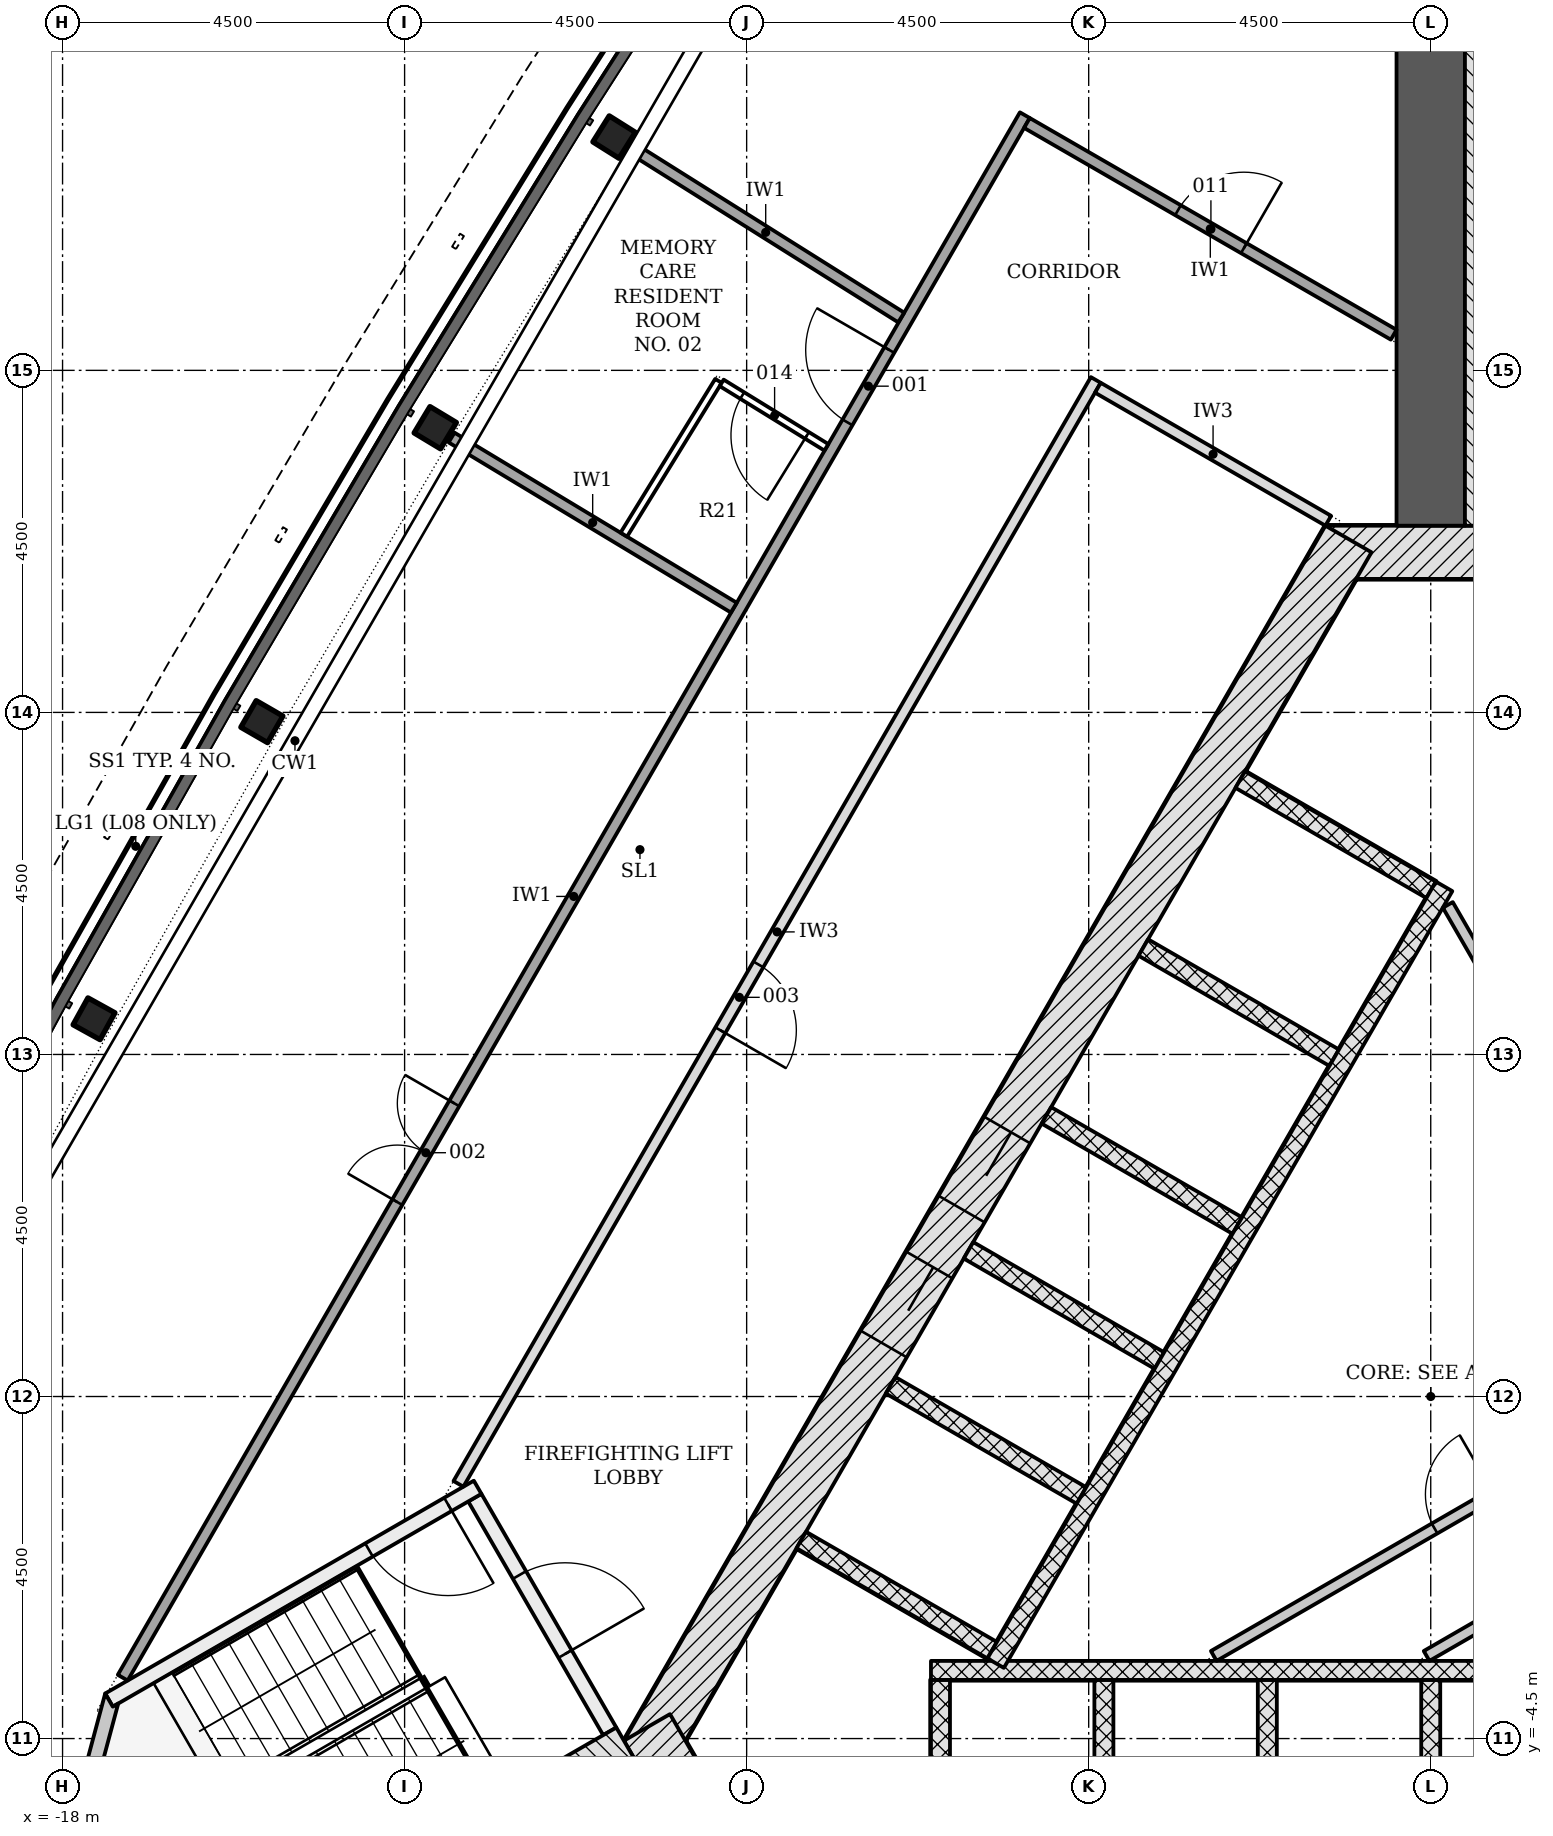
"""IFC4 building model, lengths in metres.
Left out: names, types, materials, properties, quantities, classifications, styles, units other than length and angle.
Written with IfcOpenShell. Run it as: python <this file> out.ifc"""

import sys

from ifc_helpers import new_model, si_unit, direction, frame, frame_2d, origin, origin_2d, place, context, subcontext, project, spatial, polyline, rectangle, i_section, outline, extrude, element, fill, save


model = new_model("IFC4")
c1 = context("Model", 3, precision=1e-05, world=origin(), true_north=direction((0.0, 1.0)))
c2 = subcontext(c1, "Body", "Model", "MODEL_VIEW")
j1 = project(units=[si_unit("LENGTHUNIT", "METRE"), si_unit("PLANEANGLEUNIT", "RADIAN")], contexts=[c1])
p1 = place(None, origin())
s1 = spatial("IfcSite", under=j1, at=p1, CompositionType="ELEMENT")
p2 = place(p1, origin())
s2 = spatial("IfcBuilding", under=s1, at=p2, CompositionType="ELEMENT")
p3 = place(p2, frame((0.0, 0.0, 34.8)))
s3 = spatial("IfcBuildingStorey", under=s2, at=p3, CompositionType="ELEMENT", Elevation=34.8)
p4 = place(p3, frame((1.386, 11.106, -0.2), z_axis=(0.0, 0.0, 1.0), x_axis=(-1.0, 0.0, 0.0)))
e1 = element("IfcWall", 1, at=p4, inside=s3, PredefinedType="SHEAR", context=c2, shape_type="SweptSolid", body=[
    extrude(rectangle(XDim=2.771, YDim=0.7, at=frame_2d((1.386, 0.0))), origin(), (0.0, 0.0, 1.0), 3.6),
])
p5 = place(p3, frame((-1.083, 11.281, -0.2), z_axis=(0.0, 0.0, 1.0), x_axis=(-0.500001446645, -0.866024568562, 0.0)))
e2 = element("IfcWall", 2, at=p5, inside=s3, PredefinedType="SHEAR", context=c2, shape_type="SweptSolid", body=[
    extrude(rectangle(XDim=18.458, YDim=0.7, at=frame_2d((9.229, 0.0))), origin(), (0.0, 0.0, 1.0), 3.6),
])
p6 = place(p5, frame((8.979, 0.0, 0.2)))
e3 = element("IfcOpeningElement", 3, at=p6, cuts=e2, PredefinedType="OPENING", context=c2, shape_type="SweptSolid", body=[
    extrude(rectangle(XDim=1.2, YDim=2.1, at=frame_2d((0.6, 1.05))), frame((0.0, 0.36, 0.0), z_axis=(0.0, -1.0, 0.0), x_axis=(1.0, 0.0, 0.0)), (0.0, 0.0, 1.0), 0.72),
])
p7 = place(p5, frame((11.029, 0.0, 0.2)))
e4 = element("IfcOpeningElement", 4, at=p7, cuts=e2, PredefinedType="OPENING", context=c2, shape_type="SweptSolid", body=[
    extrude(rectangle(XDim=1.2, YDim=2.1, at=frame_2d((0.6, 1.05))), frame((0.0, 0.36, 0.0), z_axis=(0.0, -1.0, 0.0), x_axis=(1.0, 0.0, 0.0)), (0.0, 0.0, 1.0), 0.72),
])
p8 = place(p3, frame((-10.311, -4.353, -0.2), z_axis=(0.0, 0.0, 1.0), x_axis=(0.500042739161, -0.866000726912, 0.0)))
e5 = element("IfcWall", 5, at=p8, inside=s3, PredefinedType="SHEAR", context=c2, shape_type="SweptSolid", body=[
    extrude(rectangle(XDim=2.771, YDim=0.7, at=frame_2d((1.386, 0.0))), origin(), (0.0, 0.0, 1.0), 3.6),
])
p9 = place(p3, frame((0.0, 11.456, -0.2), z_axis=(0.0, 0.0, 1.0), x_axis=(0.0, 1.0, 0.0)))
e6 = element("IfcWall", 6, at=p9, inside=s3, PredefinedType="SHEAR", context=c2, shape_type="SweptSolid", body=[
    extrude(rectangle(XDim=14.309, YDim=0.9, at=frame_2d((7.154, 0.0))), origin(), (0.0, 0.0, 1.0), 3.6),
])
for number, where, z_axis, x_axis in (
    (7, (-10.744, 16.569, -0.2), (0.0, 0.0, 1.0), (-0.532, -0.847, 0.0)),
    (8, (-13.097, 12.745, -0.2), (0.0, 0.0, 1.0), (-0.516, -0.857, 0.0)),
    (9, (-15.378, 8.878, -0.2), (0.0, 0.0, 1.0), (-0.5, -0.866, 0.0)),
    (10, (-17.586, 4.969, -0.2), (0.0, 0.0, 1.0), (-0.484, -0.875, 0.0)),
):
    element("IfcColumn", number, at=place(p3, frame(where, z_axis=z_axis, x_axis=x_axis)), inside=s3, PredefinedType="COLUMN", context=c2, shape_type="SweptSolid", body=[
        extrude(i_section(OverallWidth=0.404, OverallDepth=0.406, WebThickness=0.027, FlangeThickness=0.044, FilletRadius=0.015, at=origin_2d()), origin(), (0.0, 0.0, 1.0), 3.6),
    ])
for number, where, z_axis, x_axis in (
    (11, (-6.45, -6.228, -0.2), (0.0, 0.0, 1.0), (0.0, 1.0, 0.0)),
    (12, (-4.3, -6.228, -0.2), (0.0, 0.0, 1.0), (0.0, 1.0, 0.0)),
    (13, (-2.15, -6.228, -0.2), (0.0, 0.0, 1.0), (0.0, 1.0, 0.0)),
    (14, (0.0, -6.228, -0.2), (0.0, 0.0, 1.0), (0.0, 1.0, 0.0)),
):
    element("IfcWall", number, at=place(p3, frame(where, z_axis=z_axis, x_axis=x_axis)), inside=s3, PredefinedType="PARTITIONING", context=c2, shape_type="SweptSolid", body=[
        extrude(rectangle(XDim=2.5, YDim=0.25, at=frame_2d((1.25, 0.0))), origin(), (0.0, 0.0, 1.0), 3.6),
    ])
p10 = place(p3, frame((-6.575, -3.603, 0.0), z_axis=(0.0, 0.0, 1.0), x_axis=(1.0, 0.0, 0.0)))
e15 = element("IfcWall", 15, at=p10, inside=s3, PredefinedType="PARTITIONING", context=c2, shape_type="SweptSolid", body=[
    extrude(rectangle(XDim=13.15, YDim=0.25, at=frame_2d((6.575, 0.0))), origin(), (0.0, 0.0, 1.0), 3.4),
])
p11 = place(p3, frame((-2.506, 8.115, -0.2), z_axis=(0.0, 0.0, 1.0), x_axis=(0.865996321171, -0.50005036918, 0.0)))
e16 = element("IfcWall", 16, at=p11, inside=s3, PredefinedType="PARTITIONING", context=c2, shape_type="SweptSolid", body=[
    extrude(rectangle(XDim=2.9, YDim=0.25, at=frame_2d((1.45, 0.0))), origin(), (0.0, 0.0, 1.0), 3.6),
])
for number, where, z_axis, x_axis in (
    (17, (-3.781, 5.907, -0.2), (0.0, 0.0, 1.0), (0.866, -0.5, 0.0)),
    (18, (-5.056, 3.699, -0.2), (0.0, 0.0, 1.0), (0.866, -0.5, 0.0)),
    (19, (-6.081, 1.923, -0.2), (0.0, 0.0, 1.0), (0.866, -0.5, 0.0)),
    (20, (-7.106, 0.148, -0.2), (0.0, 0.0, 1.0), (0.866, -0.5, 0.0)),
    (21, (-8.281, -1.887, -0.2), (0.0, 0.0, 1.0), (0.866, -0.5, 0.0)),
):
    element("IfcWall", number, at=place(p3, frame(where, z_axis=z_axis, x_axis=x_axis)), inside=s3, PredefinedType="PARTITIONING", context=c2, shape_type="SweptSolid", body=[
        extrude(rectangle(XDim=2.9, YDim=0.25, at=frame_2d((1.45, 0.0))), origin(), (0.0, 0.0, 1.0), 3.6),
    ])
p12 = place(p3, frame((0.176, 6.711, 0.0), z_axis=(0.0, 0.0, 1.0), x_axis=(-0.500004227369, -0.866022963098, 0.0)))
e22 = element("IfcWall", 22, at=p12, inside=s3, PredefinedType="PARTITIONING", context=c2, shape_type="SweptSolid", body=[
    extrude(rectangle(XDim=11.8, YDim=0.25, at=frame_2d((5.9, 0.0))), origin(), (0.0, 0.0, 1.0), 3.4),
])
p13 = place(p3, frame((-2.854, -3.413, 0.0), z_axis=(0.0, 0.0, 1.0), x_axis=(0.866030102318, 0.499991861813, 0.0)))
e23 = element("IfcWall", 23, at=p13, inside=s3, PredefinedType="PARTITIONING", context=c2, shape_type="SweptSolid", body=[
    extrude(rectangle(XDim=10.407, YDim=0.15, at=frame_2d((5.204, 0.0))), origin(), (0.0, 0.0, 1.0), 3.4),
])
p14 = place(p13, frame((3.354, 0.0, 0.0)))
e24 = element("IfcOpeningElement", 24, at=p14, cuts=e23, PredefinedType="OPENING", context=c2, shape_type="SweptSolid", body=[
    extrude(rectangle(XDim=0.9, YDim=2.1, at=frame_2d((0.45, 1.05))), frame((0.0, 0.085, 0.0), z_axis=(0.0, -1.0, 0.0), x_axis=(1.0, 0.0, 0.0)), (0.0, 0.0, 1.0), 0.17),
])
p15 = place(p3, frame((-0.054, -3.413, 0.0), z_axis=(0.0, 0.0, 1.0), x_axis=(0.866026668906, 0.499997808738, 0.0)))
e25 = element("IfcWall", 25, at=p15, inside=s3, PredefinedType="PARTITIONING", context=c2, shape_type="SweptSolid", body=[
    extrude(rectangle(XDim=7.982, YDim=0.15, at=frame_2d((3.991, 0.0))), origin(), (0.0, 0.0, 1.0), 3.4),
])
p16 = place(p15, frame((2.092, 0.0, 0.0)))
e26 = element("IfcOpeningElement", 26, at=p16, cuts=e25, PredefinedType="OPENING", context=c2, shape_type="SweptSolid", body=[
    extrude(rectangle(XDim=1.0, YDim=2.1, at=frame_2d((0.5, 1.05))), frame((0.0, 0.085, 0.0), z_axis=(0.0, -1.0, 0.0), x_axis=(1.0, 0.0, 0.0)), (0.0, 0.0, 1.0), 0.17),
])
p17 = place(p3, frame((3.546, 0.715, 0.0), z_axis=(0.0, 0.0, 1.0), x_axis=(-0.50002895357, 0.866008686788, 0.0)))
e27 = element("IfcWall", 27, at=p17, inside=s3, PredefinedType="PARTITIONING", context=c2, shape_type="SweptSolid", body=[
    extrude(rectangle(XDim=6.642, YDim=0.15, at=frame_2d((3.321, 0.0))), origin(), (0.0, 0.0, 1.0), 3.4),
])
p18 = place(p3, frame((1.018, 11.456, -0.2), z_axis=(0.0, 0.0, 1.0), x_axis=(0.0, 1.0, 0.0)))
e28 = element("IfcWall", 28, at=p18, inside=s3, PredefinedType="SHEAR", context=c2, shape_type="SweptSolid", body=[
    extrude(rectangle(XDim=7.2, YDim=1.136, at=frame_2d((3.6, 0.0))), origin(), (0.0, 0.0, 1.0), 3.6),
])
p19 = place(p3, frame((-12.576, -1.331, -0.2), z_axis=(0.0, 0.0, 1.0), x_axis=(0.499970499736, -0.8660424351, 0.0)))
e29 = element("IfcWall", 29, at=p19, inside=s3, PredefinedType="SHEAR", context=c2, shape_type="SweptSolid", body=[
    extrude(rectangle(XDim=3.55, YDim=0.2, at=frame_2d((1.775, 0.0))), origin(), (0.0, 0.0, 1.0), 3.6),
])
p20 = place(p19, frame((1.175, 0.0, 0.2)))
e30 = element("IfcOpeningElement", 30, at=p20, cuts=e29, PredefinedType="OPENING", context=c2, shape_type="SweptSolid", body=[
    extrude(rectangle(XDim=1.2, YDim=2.1, at=frame_2d((0.6, 1.05))), frame((0.0, 0.11, 0.0), z_axis=(0.0, -1.0, 0.0), x_axis=(1.0, 0.0, 0.0)), (0.0, 0.0, 1.0), 0.22),
])
p21 = place(p3, frame((-12.539, -1.194, -0.2), z_axis=(0.0, 0.0, 1.0), x_axis=(-0.866045472092, -0.499965239061, 0.0)))
e31 = element("IfcWall", 31, at=p21, inside=s3, PredefinedType="SHEAR", context=c2, shape_type="SweptSolid", body=[
    extrude(rectangle(XDim=5.6, YDim=0.2, at=frame_2d((2.8, 0.0))), origin(), (0.0, 0.0, 1.0), 3.6),
])
p22 = place(p21, frame((0.45, 0.0, 0.2)))
e32 = element("IfcOpeningElement", 32, at=p22, cuts=e31, PredefinedType="OPENING", context=c2, shape_type="SweptSolid", body=[
    extrude(rectangle(XDim=1.2, YDim=2.1, at=frame_2d((0.6, 1.05))), frame((0.0, 0.11, 0.0), z_axis=(0.0, -1.0, 0.0), x_axis=(1.0, 0.0, 0.0)), (0.0, 0.0, 1.0), 0.22),
])
p23 = place(p3, frame((-10.43, -4.847, -0.2), z_axis=(0.0, 0.0, 1.0), x_axis=(-0.866018442252, -0.500012057535, 0.0)))
e33 = element("IfcWall", 33, at=p23, inside=s3, PredefinedType="SHEAR", context=c2, shape_type="SweptSolid", body=[
    extrude(rectangle(XDim=7.2, YDim=1.136, at=frame_2d((3.6, 0.0))), origin(), (0.0, 0.0, 1.0), 3.6),
])
p24 = place(p3, frame((0.0, 0.0, -0.2)))
e34 = element("IfcWall", 34, at=p24, inside=s3, PredefinedType="SHEAR", context=c2, shape_type="SweptSolid", body=[
    extrude(outline(polyline([(-17.439, -3.907), (-18.025, -6.093), (-16.95, -7.955), (-16.777, -7.855), (-17.81, -6.065), (-17.267, -4.039), (-17.339, -4.081), (-17.339, -4.081), (-17.339, -4.081), (-17.339, -4.081), (-17.339, -4.081), (-17.339, -4.081), (-17.339, -4.081), (-17.339, -4.081), (-17.339, -4.081), (-17.339, -4.081), (-17.339, -4.081), (-17.339, -4.081), (-17.339, -4.081), (-17.339, -4.081), (-17.339, -4.081), (-17.339, -4.081), (-17.339, -4.081), (-17.439, -3.907)])), origin(), (0.0, 0.0, 1.0), 3.6),
])
p25 = place(p3, frame((-17.208, -3.699, 0.0), z_axis=(0.0, 0.0, 1.0), x_axis=(0.499997567621, 0.866026808115, 0.0)))
e35 = element("IfcWall", 35, at=p25, inside=s3, PredefinedType="PARTITIONING", context=c2, shape_type="SweptSolid", body=[
    extrude(rectangle(XDim=23.736, YDim=0.15, at=frame_2d((11.868, 0.0))), origin(), (0.0, 0.0, 1.0), 2.768),
])
p26 = place(p25, frame((19.07, 0.0, 0.0)))
e36 = element("IfcOpeningElement", 36, at=p26, cuts=e35, PredefinedType="OPENING", context=c2, shape_type="SweptSolid", body=[
    extrude(rectangle(XDim=1.1, YDim=2.1, at=frame_2d((0.55, 1.05))), frame((0.0, 0.085, 0.0), z_axis=(0.0, -1.0, 0.0), x_axis=(1.0, 0.0, 0.0)), (0.0, 0.0, 1.0), 0.17),
])
p27 = place(p25, frame((7.225, 0.0, 0.0)))
e37 = element("IfcOpeningElement", 37, at=p27, cuts=e35, PredefinedType="OPENING", context=c2, shape_type="SweptSolid", body=[
    extrude(rectangle(XDim=1.5, YDim=2.1, at=frame_2d((0.75, 1.05))), frame((0.0, 0.085, 0.0), z_axis=(0.0, -1.0, 0.0), x_axis=(1.0, 0.0, 0.0)), (0.0, 0.0, 1.0), 0.17),
])
p28 = place(p3, frame((-4.407, 13.374, 0.0), z_axis=(0.0, 0.0, 1.0), x_axis=(-0.499997181693, -0.866027030928, 0.0)))
e38 = element("IfcWall", 38, at=p28, inside=s3, PredefinedType="PARTITIONING", context=c2, shape_type="SweptSolid", body=[
    extrude(rectangle(XDim=16.77, YDim=0.15, at=frame_2d((8.385, 0.0))), origin(), (0.0, 0.0, 1.0), 2.768),
])
p29 = place(p28, frame((8.879, 0.0, 0.0)))
e39 = element("IfcOpeningElement", 39, at=p29, cuts=e38, PredefinedType="OPENING", context=c2, shape_type="SweptSolid", body=[
    extrude(rectangle(XDim=1.0, YDim=2.1, at=frame_2d((0.5, 1.05))), frame((0.0, 0.085, 0.0), z_axis=(0.0, -1.0, 0.0), x_axis=(1.0, 0.0, 0.0)), (0.0, 0.0, 1.0), 0.17),
])
p30 = place(p3, frame((-5.312, 16.755, 0.0), z_axis=(0.0, 0.0, 1.0), x_axis=(0.866028693448, -0.499994302092, 0.0)))
e40 = element("IfcWall", 40, at=p30, inside=s3, PredefinedType="PARTITIONING", context=c2, shape_type="SweptSolid", body=[
    extrude(rectangle(XDim=5.571, YDim=0.15, at=frame_2d((2.786, 0.0))), origin(), (0.0, 0.0, 1.0), 3.4),
])
p31 = place(p30, frame((2.295, 0.0, 0.0)))
e41 = element("IfcOpeningElement", 41, at=p31, cuts=e40, PredefinedType="OPENING", context=c2, shape_type="SweptSolid", body=[
    extrude(rectangle(XDim=1.0, YDim=2.1, at=frame_2d((0.5, 1.05))), frame((0.0, 0.085, 0.0), z_axis=(0.0, -1.0, 0.0), x_axis=(1.0, 0.0, 0.0)), (0.0, 0.0, 1.0), 0.17),
])
p32 = place(p3, frame((-4.379, 13.271, 0.0), z_axis=(0.0, 0.0, 1.0), x_axis=(0.866019471182, -0.500010275428, 0.0)))
e42 = element("IfcWall", 42, at=p32, inside=s3, PredefinedType="PARTITIONING", context=c2, shape_type="SweptSolid", body=[
    extrude(rectangle(XDim=3.5, YDim=0.15, at=frame_2d((1.75, 0.0))), origin(), (0.0, 0.0, 1.0), 3.4),
])
p33 = place(p3, frame((-12.883, 12.616, 0.0), z_axis=(0.0, 0.0, 1.0), x_axis=(0.856527594015, -0.51610123105, 0.0)))
e43 = element("IfcWall", 43, at=p33, inside=s3, PredefinedType="PARTITIONING", context=c2, shape_type="SweptSolid", body=[
    extrude(rectangle(XDim=4.336, YDim=0.15, at=frame_2d((2.168, 0.0))), origin(), (0.0, 0.0, 1.0), 2.768),
])
p34 = place(p3, frame((-10.532, 16.436, 0.0), z_axis=(0.0, 0.0, 1.0), x_axis=(0.846689538327, -0.532087235036, 0.0)))
e44 = element("IfcWall", 44, at=p34, inside=s3, PredefinedType="PARTITIONING", context=c2, shape_type="SweptSolid", body=[
    extrude(rectangle(XDim=4.211, YDim=0.15, at=frame_2d((2.105, 0.0))), origin(), (0.0, 0.0, 1.0), 2.778),
])
p35 = place(p3, frame((-10.616, 11.339, 0.0), z_axis=(0.0, 0.0, 1.0), x_axis=(0.524137571403, 0.85163361033, 0.0)))
e45 = element("IfcWall", 45, at=p35, inside=s3, PredefinedType="PARTITIONING", context=c2, shape_type="SweptSolid", body=[
    extrude(rectangle(XDim=2.375, YDim=0.1, at=frame_2d((1.188, 0.0))), origin(), (0.0, 0.0, 1.0), 2.768),
])
p36 = place(p3, frame((-7.951, 12.488, 0.0), z_axis=(0.0, 0.0, 1.0), x_axis=(-0.851658316705, 0.524097425664, 0.0)))
e46 = element("IfcWall", 46, at=p36, inside=s3, PredefinedType="PARTITIONING", context=c2, shape_type="SweptSolid", body=[
    extrude(rectangle(XDim=1.617, YDim=0.1, at=frame_2d((0.809, 0.0))), origin(), (0.0, 0.0, 1.0), 3.4),
])
p37 = place(p36, frame((0.3, 0.0, 0.0)))
e47 = element("IfcOpeningElement", 47, at=p37, cuts=e46, PredefinedType="OPENING", context=c2, shape_type="SweptSolid", body=[
    extrude(rectangle(XDim=1.0, YDim=2.1, at=frame_2d((0.5, 1.05))), frame((0.0, 0.06, 0.0), z_axis=(0.0, -1.0, 0.0), x_axis=(1.0, 0.0, 0.0)), (0.0, 0.0, 1.0), 0.12),
])
p38 = place(p6, origin())
e48 = element("IfcDoor", 48, at=p38, inside=s3, OperationType="DOUBLE_DOOR_SLIDING", PredefinedType="DOOR", context=c2, shape_type="SweptSolid", body=[
    extrude(rectangle(XDim=1.2, YDim=2.1, at=frame_2d((0.6, 1.05))), frame((0.0, 0.025, 0.0), z_axis=(0.0, -1.0, 0.0), x_axis=(1.0, 0.0, 0.0)), (0.0, 0.0, 1.0), 0.05),
])
fill(e3, e48)
p39 = place(p7, origin())
e49 = element("IfcDoor", 49, at=p39, inside=s3, OperationType="DOUBLE_DOOR_SLIDING", PredefinedType="DOOR", context=c2, shape_type="SweptSolid", body=[
    extrude(rectangle(XDim=1.2, YDim=2.1, at=frame_2d((0.6, 1.05))), frame((0.0, 0.025, 0.0), z_axis=(0.0, -1.0, 0.0), x_axis=(1.0, 0.0, 0.0)), (0.0, 0.0, 1.0), 0.05),
])
fill(e4, e49)
p40 = place(p14, origin())
e50 = element("IfcDoor", 50, at=p40, inside=s3, OperationType="SINGLE_SWING_RIGHT", PredefinedType="DOOR", context=c2, shape_type="SweptSolid", body=[
    extrude(rectangle(XDim=0.9, YDim=2.1, at=frame_2d((0.45, 1.05))), frame((0.0, 0.025, 0.0), z_axis=(0.0, -1.0, 0.0), x_axis=(1.0, 0.0, 0.0)), (0.0, 0.0, 1.0), 0.05),
])
fill(e24, e50)
p41 = place(p20, origin())
e51 = element("IfcDoor", 51, at=p41, inside=s3, OperationType="SINGLE_SWING_RIGHT", PredefinedType="DOOR", context=c2, shape_type="SweptSolid", body=[
    extrude(rectangle(XDim=1.2, YDim=2.1, at=frame_2d((0.6, 1.05))), frame((0.0, 0.025, 0.0), z_axis=(0.0, -1.0, 0.0), x_axis=(1.0, 0.0, 0.0)), (0.0, 0.0, 1.0), 0.05),
])
fill(e30, e51)
p42 = place(p22, origin())
e52 = element("IfcDoor", 52, at=p42, inside=s3, OperationType="SINGLE_SWING_LEFT", PredefinedType="DOOR", context=c2, shape_type="SweptSolid", body=[
    extrude(rectangle(XDim=1.2, YDim=2.1, at=frame_2d((0.6, 1.05))), frame((0.0, 0.025, 0.0), z_axis=(0.0, -1.0, 0.0), x_axis=(1.0, 0.0, 0.0)), (0.0, 0.0, 1.0), 0.05),
])
fill(e32, e52)
p43 = place(p26, origin())
e53 = element("IfcDoor", 53, at=p43, inside=s3, OperationType="SINGLE_SWING_RIGHT", PredefinedType="DOOR", context=c2, shape_type="SweptSolid", body=[
    extrude(rectangle(XDim=1.1, YDim=2.1, at=frame_2d((0.55, 1.05))), frame((0.0, 0.025, 0.0), z_axis=(0.0, -1.0, 0.0), x_axis=(1.0, 0.0, 0.0)), (0.0, 0.0, 1.0), 0.05),
])
fill(e36, e53)
p44 = place(p27, origin())
e54 = element("IfcDoor", 54, at=p44, inside=s3, OperationType="DOUBLE_DOOR_SINGLE_SWING", PredefinedType="DOOR", context=c2, shape_type="SweptSolid", body=[
    extrude(rectangle(XDim=1.5, YDim=2.1, at=frame_2d((0.75, 1.05))), frame((0.0, 0.025, 0.0), z_axis=(0.0, -1.0, 0.0), x_axis=(1.0, 0.0, 0.0)), (0.0, 0.0, 1.0), 0.05),
])
fill(e37, e54)
p45 = place(p29, origin())
e55 = element("IfcDoor", 55, at=p45, inside=s3, OperationType="SINGLE_SWING_RIGHT", PredefinedType="DOOR", context=c2, shape_type="SweptSolid", body=[
    extrude(rectangle(XDim=1.0, YDim=2.1, at=frame_2d((0.5, 1.05))), frame((0.0, 0.025, 0.0), z_axis=(0.0, -1.0, 0.0), x_axis=(1.0, 0.0, 0.0)), (0.0, 0.0, 1.0), 0.05),
])
fill(e39, e55)
p46 = place(p31, origin())
e56 = element("IfcDoor", 56, at=p46, inside=s3, OperationType="SINGLE_SWING_RIGHT", PredefinedType="DOOR", context=c2, shape_type="SweptSolid", body=[
    extrude(rectangle(XDim=1.0, YDim=2.1, at=frame_2d((0.5, 1.05))), frame((0.0, 0.025, 0.0), z_axis=(0.0, -1.0, 0.0), x_axis=(1.0, 0.0, 0.0)), (0.0, 0.0, 1.0), 0.05),
])
fill(e41, e56)
p47 = place(p37, origin())
e57 = element("IfcDoor", 57, at=p47, inside=s3, OperationType="SINGLE_SWING_LEFT", PredefinedType="DOOR", context=c2, shape_type="SweptSolid", body=[
    extrude(rectangle(XDim=1.0, YDim=2.1, at=frame_2d((0.5, 1.05))), frame((0.0, 0.025, 0.0), z_axis=(0.0, -1.0, 0.0), x_axis=(1.0, 0.0, 0.0)), (0.0, 0.0, 1.0), 0.05),
])
fill(e47, e57)
save(model, sys.argv[1])
